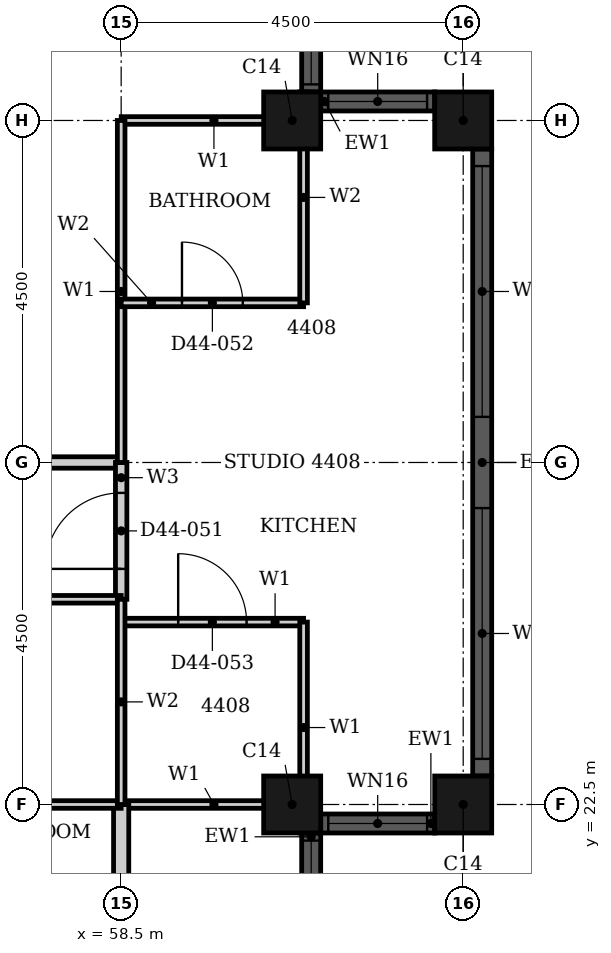
"""IFC4 building model, lengths in metres.
Left out: names, types, materials, properties, quantities, classifications, styles, units other than length and angle.
Written with IfcOpenShell. Run it as: python <this file> out.ifc"""

import sys

from ifc_helpers import new_model, si_unit, direction, frame, frame_2d, origin, origin_2d, place, context, subcontext, project, spatial, rectangle, hollow_rectangle, extrude, element, fill, save


model = new_model("IFC4")
c1 = context("Model", 3, precision=1e-05, world=origin(), true_north=direction((0.0, 1.0)))
c2 = subcontext(c1, "Body", "Model", "MODEL_VIEW")
j1 = project(units=[si_unit("LENGTHUNIT", "METRE"), si_unit("PLANEANGLEUNIT", "RADIAN")], contexts=[c1])
p1 = place(None, origin())
s1 = spatial("IfcSite", under=j1, at=p1, CompositionType="ELEMENT")
p2 = place(p1, origin())
s2 = spatial("IfcBuilding", under=s1, at=p2, CompositionType="ELEMENT")
p3 = place(p2, frame((0.0, 0.0, 176.5)))
s3 = spatial("IfcBuildingStorey", under=s2, at=p3, CompositionType="ELEMENT", Elevation=176.5)
for number, where, z_axis, x_axis in (
    (1, (60.75, 22.5, 0.0), (0.0, 0.0, 1.0), (1.0, 0.0, 0.0)),
    (2, (63.0, 22.5, 0.0), (0.0, 0.0, 1.0), (1.0, 0.0, 0.0)),
    (3, (63.0, 31.5, 0.0), (0.0, 0.0, 1.0), (1.0, 0.0, 0.0)),
    (4, (60.75, 31.5, 0.0), (0.0, 0.0, 1.0), (1.0, 0.0, 0.0)),
):
    element("IfcColumn", number, at=place(p3, frame(where, z_axis=z_axis, x_axis=x_axis)), inside=s3, PredefinedType="COLUMN", context=c2, shape_type="SweptSolid", body=[
        extrude(hollow_rectangle(XDim=0.75, YDim=0.75, WallThickness=0.024, at=origin_2d()), origin(), (0.0, 0.0, 1.0), 3.7),
    ])
p4 = place(p3, frame((61.0, 20.625, 0.0), z_axis=(0.0, 0.0, 1.0), x_axis=(0.0, 1.0, 0.0)))
e5 = element("IfcWall", 5, at=p4, inside=s3, PredefinedType="SOLIDWALL", context=c2, shape_type="SweptSolid", body=[
    extrude(rectangle(XDim=1.5, YDim=0.25, at=frame_2d((0.75, 0.0))), origin(), (0.0, 0.0, 1.0), 3.7),
])
p5 = place(p4, frame((0.1, 0.0, 0.9)))
e6 = element("IfcOpeningElement", 6, at=p5, cuts=e5, PredefinedType="OPENING", context=c2, shape_type="SweptSolid", body=[
    extrude(rectangle(XDim=1.3, YDim=1.85, at=frame_2d((0.65, 0.925))), frame((0.0, 0.135, 0.0), z_axis=(0.0, -1.0, 0.0), x_axis=(1.0, 0.0, 0.0)), (0.0, 0.0, 1.0), 0.27),
])
p6 = place(p3, frame((61.125, 22.25, 0.0), z_axis=(0.0, 0.0, 1.0), x_axis=(1.0, 0.0, 0.0)))
e7 = element("IfcWall", 7, at=p6, inside=s3, PredefinedType="SOLIDWALL", context=c2, shape_type="SweptSolid", body=[
    extrude(rectangle(XDim=1.5, YDim=0.25, at=frame_2d((0.75, 0.0))), origin(), (0.0, 0.0, 1.0), 3.7),
])
p7 = place(p6, frame((0.1, 0.0, 0.9)))
e8 = element("IfcOpeningElement", 8, at=p7, cuts=e7, PredefinedType="OPENING", context=c2, shape_type="SweptSolid", body=[
    extrude(rectangle(XDim=1.3, YDim=1.85, at=frame_2d((0.65, 0.925))), frame((0.0, 0.135, 0.0), z_axis=(0.0, -1.0, 0.0), x_axis=(1.0, 0.0, 0.0)), (0.0, 0.0, 1.0), 0.27),
])
p8 = place(p3, frame((63.25, 22.875, 0.0), z_axis=(0.0, 0.0, 1.0), x_axis=(0.0, 1.0, 0.0)))
e9 = element("IfcWall", 9, at=p8, inside=s3, PredefinedType="SOLIDWALL", context=c2, shape_type="SweptSolid", body=[
    extrude(rectangle(XDim=8.25, YDim=0.25, at=frame_2d((4.125, 0.0))), origin(), (0.0, 0.0, 1.0), 3.7),
])
p9 = place(p8, frame((0.225, 0.0, 0.45)))
e10 = element("IfcOpeningElement", 10, at=p9, cuts=e9, PredefinedType="OPENING", context=c2, shape_type="SweptSolid", body=[
    extrude(rectangle(XDim=3.3, YDim=2.3, at=frame_2d((1.65, 1.15))), frame((0.0, 0.135, 0.0), z_axis=(0.0, -1.0, 0.0), x_axis=(1.0, 0.0, 0.0)), (0.0, 0.0, 1.0), 0.27),
])
p10 = place(p8, frame((4.725, 0.0, 0.45)))
e11 = element("IfcOpeningElement", 11, at=p10, cuts=e9, PredefinedType="OPENING", context=c2, shape_type="SweptSolid", body=[
    extrude(rectangle(XDim=3.3, YDim=2.3, at=frame_2d((1.65, 1.15))), frame((0.0, 0.135, 0.0), z_axis=(0.0, -1.0, 0.0), x_axis=(1.0, 0.0, 0.0)), (0.0, 0.0, 1.0), 0.27),
])
p11 = place(p3, frame((62.625, 31.75, 0.0), z_axis=(0.0, 0.0, 1.0), x_axis=(-1.0, 0.0, 0.0)))
e12 = element("IfcWall", 12, at=p11, inside=s3, PredefinedType="SOLIDWALL", context=c2, shape_type="SweptSolid", body=[
    extrude(rectangle(XDim=1.5, YDim=0.25, at=frame_2d((0.75, 0.0))), origin(), (0.0, 0.0, 1.0), 3.7),
])
p12 = place(p11, frame((0.1, 0.0, 0.9)))
e13 = element("IfcOpeningElement", 13, at=p12, cuts=e12, PredefinedType="OPENING", context=c2, shape_type="SweptSolid", body=[
    extrude(rectangle(XDim=1.3, YDim=1.85, at=frame_2d((0.65, 0.925))), frame((0.0, 0.135, 0.0), z_axis=(0.0, -1.0, 0.0), x_axis=(1.0, 0.0, 0.0)), (0.0, 0.0, 1.0), 0.27),
])
p13 = place(p3, frame((61.0, 31.875, 0.0), z_axis=(0.0, 0.0, 1.0), x_axis=(0.0, 1.0, 0.0)))
e14 = element("IfcWall", 14, at=p13, inside=s3, PredefinedType="SOLIDWALL", context=c2, shape_type="SweptSolid", body=[
    extrude(rectangle(XDim=1.5, YDim=0.25, at=frame_2d((0.75, 0.0))), origin(), (0.0, 0.0, 1.0), 3.7),
])
p14 = place(p13, frame((0.1, 0.0, 0.9)))
e15 = element("IfcOpeningElement", 15, at=p14, cuts=e14, PredefinedType="OPENING", context=c2, shape_type="SweptSolid", body=[
    extrude(rectangle(XDim=1.3, YDim=1.85, at=frame_2d((0.65, 0.925))), frame((0.0, 0.135, 0.0), z_axis=(0.0, -1.0, 0.0), x_axis=(1.0, 0.0, 0.0)), (0.0, 0.0, 1.0), 0.27),
])
p15 = place(p3, frame((45.0, 27.0, 0.0), z_axis=(0.0, 0.0, 1.0), x_axis=(1.0, 0.0, 0.0)))
e16 = element("IfcWall", 16, at=p15, inside=s3, PredefinedType="PARTITIONING", context=c2, shape_type="SweptSolid", body=[
    extrude(rectangle(XDim=13.5, YDim=0.15, at=frame_2d((6.75, 0.0))), origin(), (0.0, 0.0, 1.0), 2.68),
])
p16 = place(p15, frame((7.15, 0.0, 0.0)))
e17 = element("IfcOpeningElement", 17, at=p16, cuts=e16, PredefinedType="OPENING", context=c2, shape_type="SweptSolid", body=[
    extrude(rectangle(XDim=1.0, YDim=2.1, at=frame_2d((0.5, 1.05))), frame((0.0, 0.085, 0.0), z_axis=(0.0, -1.0, 0.0), x_axis=(1.0, 0.0, 0.0)), (0.0, 0.0, 1.0), 0.17),
])
p17 = place(p3, frame((58.5, 25.2, 0.0), z_axis=(0.0, 0.0, 1.0), x_axis=(0.0, 1.0, 0.0)))
e18 = element("IfcWall", 18, at=p17, inside=s3, PredefinedType="PARTITIONING", context=c2, shape_type="SweptSolid", body=[
    extrude(rectangle(XDim=1.8, YDim=0.15, at=frame_2d((0.9, 0.0))), origin(), (0.0, 0.0, 1.0), 3.4),
])
p18 = place(p17, frame((0.4, 0.0, 0.0)))
e19 = element("IfcOpeningElement", 19, at=p18, cuts=e18, PredefinedType="OPENING", context=c2, shape_type="SweptSolid", body=[
    extrude(rectangle(XDim=1.0, YDim=2.2, at=frame_2d((0.5, 1.1))), frame((0.0, 0.085, 0.0), z_axis=(0.0, -1.0, 0.0), x_axis=(1.0, 0.0, 0.0)), (0.0, 0.0, 1.0), 0.17),
])
p19 = place(p3, frame((58.501, 22.5, 0.0), z_axis=(0.0, 0.0, 1.0), x_axis=(1.0, 0.0, 0.0)))
e20 = element("IfcWall", 20, at=p19, inside=s3, PredefinedType="PARTITIONING", context=c2, shape_type="SweptSolid", body=[
    extrude(rectangle(XDim=2.439, YDim=0.1, at=frame_2d((1.219, 0.0))), origin(), (0.0, 0.0, 1.0), 2.68),
])
p20 = place(p3, frame((58.5, 24.9, 0.0), z_axis=(0.0, 0.0, 1.0), x_axis=(1.0, 0.0, 0.0)))
e21 = element("IfcWall", 21, at=p20, inside=s3, PredefinedType="PARTITIONING", context=c2, shape_type="SweptSolid", body=[
    extrude(rectangle(XDim=2.4, YDim=0.1, at=frame_2d((1.2, 0.0))), origin(), (0.0, 0.0, 1.0), 3.4),
])
p21 = place(p20, frame((0.75, 0.0, 0.0)))
e22 = element("IfcOpeningElement", 22, at=p21, cuts=e21, PredefinedType="OPENING", context=c2, shape_type="SweptSolid", body=[
    extrude(rectangle(XDim=0.9, YDim=2.1, at=frame_2d((0.45, 1.05))), frame((0.0, 0.06, 0.0), z_axis=(0.0, -1.0, 0.0), x_axis=(1.0, 0.0, 0.0)), (0.0, 0.0, 1.0), 0.12),
])
p22 = place(p3, frame((58.501, 31.5, 0.0), z_axis=(0.0, 0.0, 1.0), x_axis=(1.0, 0.0, 0.0)))
e23 = element("IfcWall", 23, at=p22, inside=s3, PredefinedType="PARTITIONING", context=c2, shape_type="SweptSolid", body=[
    extrude(rectangle(XDim=2.439, YDim=0.1, at=frame_2d((1.219, 0.0))), origin(), (0.0, 0.0, 1.0), 2.68),
])
p23 = place(p3, frame((58.5, 27.0, 0.0), z_axis=(0.0, 0.0, 1.0), x_axis=(0.0, 1.0, 0.0)))
e24 = element("IfcWall", 24, at=p23, inside=s3, PredefinedType="PARTITIONING", context=c2, shape_type="SweptSolid", body=[
    extrude(rectangle(XDim=4.5, YDim=0.1, at=frame_2d((2.25, 0.0))), origin(), (0.0, 0.0, 1.0), 3.4),
])
p24 = place(p3, frame((60.9, 22.125, 0.0), z_axis=(0.0, 0.0, 1.0), x_axis=(0.0, 1.0, 0.0)))
e25 = element("IfcWall", 25, at=p24, inside=s3, PredefinedType="PARTITIONING", context=c2, shape_type="SweptSolid", body=[
    extrude(rectangle(XDim=2.775, YDim=0.1, at=frame_2d((1.387, 0.0))), origin(), (0.0, 0.0, 1.0), 3.4),
])
p25 = place(p3, frame((58.5, 20.06, 0.0), z_axis=(0.0, 0.0, 1.0), x_axis=(0.0, 1.0, 0.0)))
e26 = element("IfcWall", 26, at=p25, inside=s3, PredefinedType="PARTITIONING", context=c2, shape_type="SweptSolid", body=[
    extrude(rectangle(XDim=2.439, YDim=0.2, at=frame_2d((1.219, 0.0))), origin(), (0.0, 0.0, 1.0), 3.4),
])
p26 = place(p3, frame((56.1, 22.5, 0.0), z_axis=(0.0, 0.0, 1.0), x_axis=(1.0, 0.0, 0.0)))
e27 = element("IfcWall", 27, at=p26, inside=s3, PredefinedType="PARTITIONING", context=c2, shape_type="SweptSolid", body=[
    extrude(rectangle(XDim=2.4, YDim=0.1, at=frame_2d((1.2, 0.0))), origin(), (0.0, 0.0, 1.0), 2.68),
])
p27 = place(p3, frame((56.1, 25.2, 0.0), z_axis=(0.0, 0.0, 1.0), x_axis=(1.0, 0.0, 0.0)))
e28 = element("IfcWall", 28, at=p27, inside=s3, PredefinedType="PARTITIONING", context=c2, shape_type="SweptSolid", body=[
    extrude(rectangle(XDim=2.4, YDim=0.1, at=frame_2d((1.2, 0.0))), origin(), (0.0, 0.0, 1.0), 3.4),
])
p28 = place(p3, frame((58.5, 29.1, 0.0), z_axis=(0.0, 0.0, 1.0), x_axis=(1.0, 0.0, 0.0)))
e29 = element("IfcWall", 29, at=p28, inside=s3, PredefinedType="PARTITIONING", context=c2, shape_type="SweptSolid", body=[
    extrude(rectangle(XDim=2.4, YDim=0.1, at=frame_2d((1.2, 0.0))), origin(), (0.0, 0.0, 1.0), 3.4),
])
p29 = place(p28, frame((0.8, 0.0, 0.0)))
e30 = element("IfcOpeningElement", 30, at=p29, cuts=e29, PredefinedType="OPENING", context=c2, shape_type="SweptSolid", body=[
    extrude(rectangle(XDim=0.8, YDim=2.1, at=frame_2d((0.4, 1.05))), frame((0.0, 0.06, 0.0), z_axis=(0.0, -1.0, 0.0), x_axis=(1.0, 0.0, 0.0)), (0.0, 0.0, 1.0), 0.12),
])
p30 = place(p3, frame((58.5, 22.5, 0.0), z_axis=(0.0, 0.0, 1.0), x_axis=(0.0, 1.0, 0.0)))
e31 = element("IfcWall", 31, at=p30, inside=s3, PredefinedType="PARTITIONING", context=c2, shape_type="SweptSolid", body=[
    extrude(rectangle(XDim=2.7, YDim=0.1, at=frame_2d((1.35, 0.0))), origin(), (0.0, 0.0, 1.0), 3.4),
])
p31 = place(p3, frame((60.9, 29.1, 0.0), z_axis=(0.0, 0.0, 1.0), x_axis=(0.0, 1.0, 0.0)))
e32 = element("IfcWall", 32, at=p31, inside=s3, PredefinedType="PARTITIONING", context=c2, shape_type="SweptSolid", body=[
    extrude(rectangle(XDim=2.775, YDim=0.1, at=frame_2d((1.387, 0.0))), origin(), (0.0, 0.0, 1.0), 3.4),
])
p32 = place(p5, origin())
e33 = element("IfcWindow", 33, at=p32, inside=s3, PartitioningType="SINGLE_PANEL", PredefinedType="WINDOW", context=c2, shape_type="SweptSolid", body=[
    extrude(rectangle(XDim=1.3, YDim=1.85, at=frame_2d((0.65, 0.925))), frame((0.0, 0.03, 0.0), z_axis=(0.0, -1.0, 0.0), x_axis=(1.0, 0.0, 0.0)), (0.0, 0.0, 1.0), 0.06),
])
fill(e6, e33)
p33 = place(p7, origin())
e34 = element("IfcWindow", 34, at=p33, inside=s3, PartitioningType="SINGLE_PANEL", PredefinedType="WINDOW", context=c2, shape_type="SweptSolid", body=[
    extrude(rectangle(XDim=1.3, YDim=1.85, at=frame_2d((0.65, 0.925))), frame((0.0, 0.03, 0.0), z_axis=(0.0, -1.0, 0.0), x_axis=(1.0, 0.0, 0.0)), (0.0, 0.0, 1.0), 0.06),
])
fill(e8, e34)
p34 = place(p9, origin())
e35 = element("IfcWindow", 35, at=p34, inside=s3, PartitioningType="SINGLE_PANEL", PredefinedType="WINDOW", context=c2, shape_type="SweptSolid", body=[
    extrude(rectangle(XDim=3.3, YDim=2.3, at=frame_2d((1.65, 1.15))), frame((0.0, 0.03, 0.0), z_axis=(0.0, -1.0, 0.0), x_axis=(1.0, 0.0, 0.0)), (0.0, 0.0, 1.0), 0.06),
])
fill(e10, e35)
p35 = place(p10, origin())
e36 = element("IfcWindow", 36, at=p35, inside=s3, PartitioningType="SINGLE_PANEL", PredefinedType="WINDOW", context=c2, shape_type="SweptSolid", body=[
    extrude(rectangle(XDim=3.3, YDim=2.3, at=frame_2d((1.65, 1.15))), frame((0.0, 0.03, 0.0), z_axis=(0.0, -1.0, 0.0), x_axis=(1.0, 0.0, 0.0)), (0.0, 0.0, 1.0), 0.06),
])
fill(e11, e36)
p36 = place(p12, origin())
e37 = element("IfcWindow", 37, at=p36, inside=s3, PartitioningType="SINGLE_PANEL", PredefinedType="WINDOW", context=c2, shape_type="SweptSolid", body=[
    extrude(rectangle(XDim=1.3, YDim=1.85, at=frame_2d((0.65, 0.925))), frame((0.0, 0.03, 0.0), z_axis=(0.0, -1.0, 0.0), x_axis=(1.0, 0.0, 0.0)), (0.0, 0.0, 1.0), 0.06),
])
fill(e13, e37)
p37 = place(p14, origin())
e38 = element("IfcWindow", 38, at=p37, inside=s3, PartitioningType="SINGLE_PANEL", PredefinedType="WINDOW", context=c2, shape_type="SweptSolid", body=[
    extrude(rectangle(XDim=1.3, YDim=1.85, at=frame_2d((0.65, 0.925))), frame((0.0, 0.03, 0.0), z_axis=(0.0, -1.0, 0.0), x_axis=(1.0, 0.0, 0.0)), (0.0, 0.0, 1.0), 0.06),
])
fill(e15, e38)
p38 = place(p18, origin())
e39 = element("IfcDoor", 39, at=p38, inside=s3, OperationType="SINGLE_SWING_RIGHT", PredefinedType="DOOR", context=c2, shape_type="SweptSolid", body=[
    extrude(rectangle(XDim=1.0, YDim=2.2, at=frame_2d((0.5, 1.1))), frame((0.0, 0.025, 0.0), z_axis=(0.0, -1.0, 0.0), x_axis=(1.0, 0.0, 0.0)), (0.0, 0.0, 1.0), 0.05),
])
fill(e19, e39)
p39 = place(p29, origin())
e40 = element("IfcDoor", 40, at=p39, inside=s3, OperationType="SINGLE_SWING_RIGHT", PredefinedType="DOOR", context=c2, shape_type="SweptSolid", body=[
    extrude(rectangle(XDim=0.8, YDim=2.1, at=frame_2d((0.4, 1.05))), frame((0.0, 0.025, 0.0), z_axis=(0.0, -1.0, 0.0), x_axis=(1.0, 0.0, 0.0)), (0.0, 0.0, 1.0), 0.05),
])
fill(e30, e40)
p40 = place(p21, origin())
e41 = element("IfcDoor", 41, at=p40, inside=s3, OperationType="SINGLE_SWING_LEFT", PredefinedType="DOOR", context=c2, shape_type="SweptSolid", body=[
    extrude(rectangle(XDim=0.9, YDim=2.1, at=frame_2d((0.45, 1.05))), frame((0.0, 0.025, 0.0), z_axis=(0.0, -1.0, 0.0), x_axis=(1.0, 0.0, 0.0)), (0.0, 0.0, 1.0), 0.05),
])
fill(e22, e41)
save(model, sys.argv[1])
